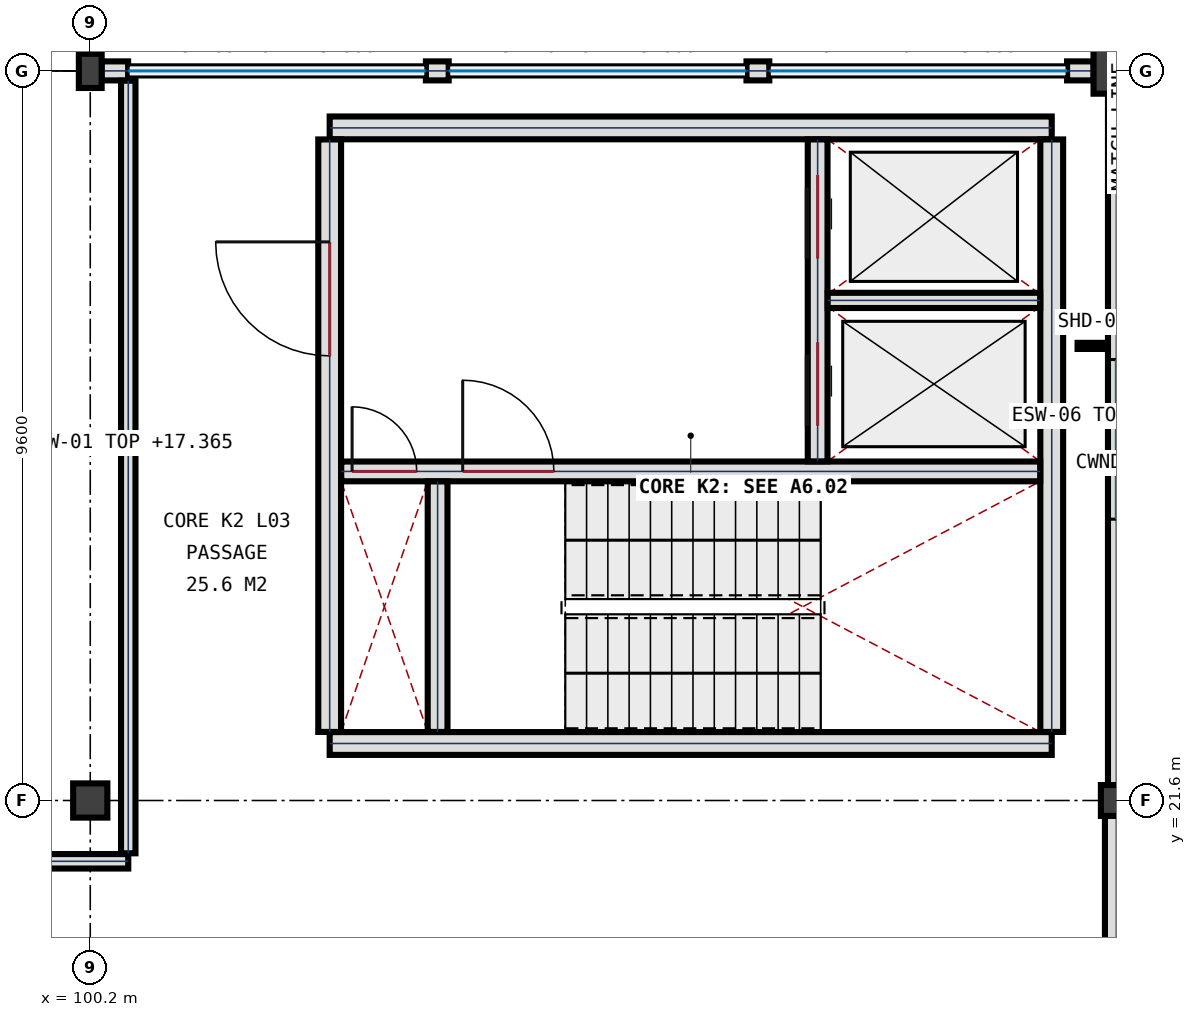
"""IFC4 building model, lengths in metres.
Left out: names, types, materials, properties, quantities, classifications, styles, units other than length and angle.
Written with IfcOpenShell. Run it as: python <this file> out.ifc"""

import sys

from ifc_helpers import new_model, si_unit, direction, frame, frame_2d, origin, origin_2d, place, context, subcontext, project, spatial, rectangle, circle, hollow_circle, i_section, extrude, element, fill, save


model = new_model("IFC4")
c1 = context("Model", 3, precision=1e-05, world=origin(), true_north=direction((0.0, 1.0)))
c2 = subcontext(c1, "Body", "Model", "MODEL_VIEW")
j1 = project(units=[si_unit("LENGTHUNIT", "METRE"), si_unit("PLANEANGLEUNIT", "RADIAN")], contexts=[c1])
p1 = place(None, origin())
s1 = spatial("IfcSite", under=j1, at=p1, CompositionType="ELEMENT")
p2 = place(p1, origin())
s2 = spatial("IfcBuilding", under=s1, at=p2, CompositionType="ELEMENT")
p3 = place(p2, frame((0.0, 0.0, 14.4)))
s3 = spatial("IfcBuildingStorey", under=s2, at=p3, CompositionType="ELEMENT", Elevation=14.4)
p4 = place(p3, frame((100.2, 21.6, 0.0), z_axis=(0.0, 0.0, 1.0), x_axis=(1.0, 0.0, 0.0)))
e1 = element("IfcColumn", 1, at=p4, inside=s3, PredefinedType="COLUMN", context=c2, shape_type="SweptSolid", body=[
    extrude(rectangle(XDim=0.45, YDim=0.45, at=origin_2d()), origin(), (0.0, 0.0, 1.0), 4.5),
])
p5 = place(p3, frame((100.2, 31.2, 0.0), z_axis=(0.0, 0.0, 1.0), x_axis=(1.0, 0.0, 0.0)))
e2 = element("IfcColumn", 2, at=p5, inside=s3, PredefinedType="COLUMN", context=c2, shape_type="SweptSolid", body=[
    extrude(i_section(OverallWidth=0.3, OverallDepth=0.45, WebThickness=0.014, FlangeThickness=0.026, FilletRadius=0.027, at=origin_2d()), origin(), (0.0, 0.0, 1.0), 4.5),
])
p6 = place(p3, frame((113.7, 21.6, 0.0), z_axis=(0.0, 0.0, 1.0), x_axis=(1.0, 0.0, 0.0)))
e3 = element("IfcColumn", 3, at=p6, inside=s3, PredefinedType="COLUMN", context=c2, shape_type="SweptSolid", body=[
    extrude(hollow_circle(Radius=0.203, WallThickness=0.016, at=origin_2d()), origin(), (0.0, 0.0, 1.0), 4.5),
])
p7 = place(p3, frame((113.7, 31.2, 0.0), z_axis=(0.0, 0.0, 1.0), x_axis=(1.0, 0.0, 0.0)))
e4 = element("IfcColumn", 4, at=p7, inside=s3, PredefinedType="COLUMN", context=c2, shape_type="SweptSolid", body=[
    extrude(circle(Radius=0.3, at=origin_2d()), origin(), (0.0, 0.0, 1.0), 4.5),
])
p8 = place(p3, frame((100.2, 31.773, 0.0), z_axis=(0.0, 0.0, 1.0), x_axis=(0.0, -1.0, 0.0)))
e5 = element("IfcWall", 5, at=p8, inside=s3, PredefinedType="SOLIDWALL", context=c2, shape_type="SweptSolid", body=[
    extrude(rectangle(XDim=0.35, YDim=0.25, at=frame_2d((0.175, 0.0))), origin(), (0.0, 0.0, 1.0), 3.6),
])
for number, where, z_axis, x_axis in (
    (6, (100.348, 31.2, 0.0), (0.0, 0.0, 1.0), (1.0, 0.0, 0.0)),
    (7, (113.052, 31.2, 0.0), (0.0, 0.0, 1.0), (1.0, 0.0, 0.0)),
):
    element("IfcWall", number, at=place(p3, frame(where, z_axis=z_axis, x_axis=x_axis)), inside=s3, PredefinedType="SOLIDWALL", context=c2, shape_type="SweptSolid", body=[
        extrude(rectangle(XDim=0.35, YDim=0.25, at=frame_2d((0.175, 0.0))), origin(), (0.0, 0.0, 1.0), 3.6),
    ])
for number, where, z_axis, x_axis in (
    (8, (104.616, 31.2, 0.0), (0.0, 0.0, 1.0), (1.0, 0.0, 0.0)),
    (9, (108.834, 31.2, 0.0), (0.0, 0.0, 1.0), (1.0, 0.0, 0.0)),
):
    element("IfcWall", number, at=place(p3, frame(where, z_axis=z_axis, x_axis=x_axis)), inside=s3, PredefinedType="SOLIDWALL", context=c2, shape_type="SweptSolid", body=[
        extrude(rectangle(XDim=0.3, YDim=0.25, at=frame_2d((0.15, 0.0))), origin(), (0.0, 0.0, 1.0), 3.6),
    ])
p9 = place(p3, frame((113.7, 30.902, 0.0), z_axis=(0.0, 0.0, 1.0), x_axis=(0.0, -1.0, 0.0)))
e10 = element("IfcWall", 10, at=p9, inside=s3, PredefinedType="SOLIDWALL", context=c2, shape_type="SweptSolid", body=[
    extrude(rectangle(XDim=9.101, YDim=0.22, at=frame_2d((4.55, 0.0))), origin(), (0.0, 0.0, 1.0), 3.21),
])
p10 = place(p9, frame((3.5, 0.0, 0.95)))
e11 = element("IfcOpeningElement", 11, at=p10, cuts=e10, PredefinedType="OPENING", context=c2, shape_type="SweptSolid", body=[
    extrude(rectangle(XDim=2.1, YDim=1.35, at=frame_2d((1.05, 0.675))), frame((0.0, 0.12, 0.0), z_axis=(0.0, -1.0, 0.0), x_axis=(1.0, 0.0, 0.0)), (0.0, 0.0, 1.0), 0.24),
])
p11 = place(p3, frame((113.7, 21.399, 0.0), z_axis=(0.0, 0.0, 1.0), x_axis=(0.0, -1.0, 0.0)))
e12 = element("IfcWall", 12, at=p11, inside=s3, PredefinedType="SOLIDWALL", context=c2, shape_type="SweptSolid", body=[
    extrude(rectangle(XDim=9.001, YDim=0.3, at=frame_2d((4.5, 0.0))), origin(), (0.0, 0.0, 1.0), 3.5),
])
p12 = place(p11, frame((5.849, 0.0, 0.0)))
e13 = element("IfcOpeningElement", 13, at=p12, cuts=e12, PredefinedType="OPENING", context=c2, shape_type="SweptSolid", body=[
    extrude(rectangle(XDim=1.5, YDim=2.2, at=frame_2d((0.75, 1.1))), frame((0.0, 0.16, 0.0), z_axis=(0.0, -1.0, 0.0), x_axis=(1.0, 0.0, 0.0)), (0.0, 0.0, 1.0), 0.32),
])
for number, where, z_axis, x_axis in (
    (14, (112.85, 22.35, 0.0), (0.0, 0.0, 1.0), (-1.0, 0.0, 0.0)),
    (15, (103.35, 30.45, 0.0), (0.0, 0.0, 1.0), (1.0, 0.0, 0.0)),
):
    element("IfcWall", number, at=place(p3, frame(where, z_axis=z_axis, x_axis=x_axis)), inside=s3, PredefinedType="SHEAR", context=c2, shape_type="SweptSolid", body=[
        extrude(rectangle(XDim=9.5, YDim=0.3, at=frame_2d((4.75, 0.0))), origin(), (0.0, 0.0, 1.0), 4.5),
    ])
p13 = place(p3, frame((103.35, 22.502, 0.0), z_axis=(0.0, 0.0, 1.0), x_axis=(0.0, 1.0, 0.0)))
e16 = element("IfcWall", 16, at=p13, inside=s3, PredefinedType="SHEAR", context=c2, shape_type="SweptSolid", body=[
    extrude(rectangle(XDim=7.796, YDim=0.3, at=frame_2d((3.898, 0.0))), origin(), (0.0, 0.0, 1.0), 4.5),
])
p14 = place(p13, frame((4.948, 0.0, 0.0)))
e17 = element("IfcOpeningElement", 17, at=p14, cuts=e16, PredefinedType="OPENING", context=c2, shape_type="SweptSolid", body=[
    extrude(rectangle(XDim=1.5, YDim=2.25, at=frame_2d((0.75, 1.125))), frame((0.0, 0.16, 0.0), z_axis=(0.0, -1.0, 0.0), x_axis=(1.0, 0.0, 0.0)), (0.0, 0.0, 1.0), 0.32),
])
p15 = place(p3, frame((112.85, 30.298, 0.0), z_axis=(0.0, 0.0, 1.0), x_axis=(0.0, -1.0, 0.0)))
e18 = element("IfcWall", 18, at=p15, inside=s3, PredefinedType="SHEAR", context=c2, shape_type="SweptSolid", body=[
    extrude(rectangle(XDim=7.796, YDim=0.3, at=frame_2d((3.898, 0.0))), origin(), (0.0, 0.0, 1.0), 4.5),
])
p16 = place(p3, frame((103.502, 25.93, 0.0), z_axis=(0.0, 0.0, 1.0), x_axis=(1.0, 0.0, 0.0)))
e19 = element("IfcWall", 19, at=p16, inside=s3, PredefinedType="SHEAR", context=c2, shape_type="SweptSolid", body=[
    extrude(rectangle(XDim=9.196, YDim=0.26, at=frame_2d((4.598, 0.0))), origin(), (0.0, 0.0, 1.0), 4.5),
])
p17 = place(p16, frame((1.598, 0.0, 0.0)))
e20 = element("IfcOpeningElement", 20, at=p17, cuts=e19, PredefinedType="OPENING", context=c2, shape_type="SweptSolid", body=[
    extrude(rectangle(XDim=1.2, YDim=2.2, at=frame_2d((0.6, 1.1))), frame((0.0, 0.14, 0.0), z_axis=(0.0, -1.0, 0.0), x_axis=(1.0, 0.0, 0.0)), (0.0, 0.0, 1.0), 0.28),
])
p18 = place(p16, frame((0.143, 0.0, 0.0)))
e21 = element("IfcOpeningElement", 21, at=p18, cuts=e19, PredefinedType="OPENING", context=c2, shape_type="SweptSolid", body=[
    extrude(rectangle(XDim=0.85, YDim=2.05, at=frame_2d((0.425, 1.025))), frame((0.0, 0.14, 0.0), z_axis=(0.0, -1.0, 0.0), x_axis=(1.0, 0.0, 0.0)), (0.0, 0.0, 1.0), 0.28),
])
p19 = place(p3, frame((104.77, 22.502, 0.0), z_axis=(0.0, 0.0, 1.0), x_axis=(0.0, 1.0, 0.0)))
e22 = element("IfcWall", 22, at=p19, inside=s3, PredefinedType="SHEAR", context=c2, shape_type="SweptSolid", body=[
    extrude(rectangle(XDim=3.296, YDim=0.26, at=frame_2d((1.648, 0.0))), origin(), (0.0, 0.0, 1.0), 4.5),
])
p20 = place(p3, frame((109.77, 26.062, 0.0), z_axis=(0.0, 0.0, 1.0), x_axis=(0.0, 1.0, 0.0)))
e23 = element("IfcWall", 23, at=p20, inside=s3, PredefinedType="SHEAR", context=c2, shape_type="SweptSolid", body=[
    extrude(rectangle(XDim=4.236, YDim=0.26, at=frame_2d((2.118, 0.0))), origin(), (0.0, 0.0, 1.0), 4.5),
])
p21 = place(p20, frame((0.468, 0.0, 0.0)))
e24 = element("IfcOpeningElement", 24, at=p21, cuts=e23, PredefinedType="OPENING", context=c2, shape_type="SweptSolid", body=[
    extrude(rectangle(XDim=1.1, YDim=2.15, at=frame_2d((0.55, 1.075))), frame((0.0, 0.14, 0.0), z_axis=(0.0, -1.0, 0.0), x_axis=(1.0, 0.0, 0.0)), (0.0, 0.0, 1.0), 0.28),
])
p22 = place(p20, frame((2.668, 0.0, 0.0)))
e25 = element("IfcOpeningElement", 25, at=p22, cuts=e23, PredefinedType="OPENING", context=c2, shape_type="SweptSolid", body=[
    extrude(rectangle(XDim=1.1, YDim=2.15, at=frame_2d((0.55, 1.075))), frame((0.0, 0.14, 0.0), z_axis=(0.0, -1.0, 0.0), x_axis=(1.0, 0.0, 0.0)), (0.0, 0.0, 1.0), 0.28),
])
p23 = place(p3, frame((109.902, 28.18, 0.0), z_axis=(0.0, 0.0, 1.0), x_axis=(1.0, 0.0, 0.0)))
e26 = element("IfcWall", 26, at=p23, inside=s3, PredefinedType="PLUMBINGWALL", context=c2, shape_type="SweptSolid", body=[
    extrude(rectangle(XDim=2.796, YDim=0.2, at=frame_2d((1.398, 0.0))), origin(), (0.0, 0.0, 1.0), 4.16),
])
p24 = place(p3, frame((59.2, 20.8, 0.0), z_axis=(0.0, 0.0, 1.0), x_axis=(1.0, 0.0, 0.0)))
e27 = element("IfcWall", 27, at=p24, inside=s3, PredefinedType="PARTITIONING", context=c2, shape_type="SweptSolid", body=[
    extrude(rectangle(XDim=41.5, YDim=0.19, at=frame_2d((20.75, 0.0))), origin(), (0.0, 0.0, 1.0), 3.5),
])
p25 = place(p24, frame((19.875, 0.0, 0.0)))
e28 = element("IfcOpeningElement", 28, at=p25, cuts=e27, PredefinedType="OPENING", context=c2, shape_type="SweptSolid", body=[
    extrude(rectangle(XDim=1.85, YDim=2.35, at=frame_2d((0.925, 1.175))), frame((0.0, 0.105, 0.0), z_axis=(0.0, -1.0, 0.0), x_axis=(1.0, 0.0, 0.0)), (0.0, 0.0, 1.0), 0.21),
])
p26 = place(p3, frame((100.7, 20.905, 0.0), z_axis=(0.0, 0.0, 1.0), x_axis=(0.0, 1.0, 0.0)))
e29 = element("IfcWall", 29, at=p26, inside=s3, PredefinedType="PARTITIONING", context=c2, shape_type="SweptSolid", body=[
    extrude(rectangle(XDim=10.166, YDim=0.19, at=frame_2d((5.083, 0.0))), origin(), (0.0, 0.0, 1.0), 2.965),
])
p27 = place(p10, origin())
e30 = element("IfcWindow", 30, at=p27, inside=s3, PartitioningType="SINGLE_PANEL", PredefinedType="WINDOW", context=c2, shape_type="SweptSolid", body=[
    extrude(rectangle(XDim=2.1, YDim=1.35, at=frame_2d((1.05, 0.675))), frame((0.0, 0.032, 0.0), z_axis=(0.0, -1.0, 0.0), x_axis=(1.0, 0.0, 0.0)), (0.0, 0.0, 1.0), 0.065),
])
fill(e11, e30)
p28 = place(p14, origin())
e31 = element("IfcDoor", 31, at=p28, inside=s3, OperationType="SINGLE_SWING_RIGHT", PredefinedType="DOOR", context=c2, shape_type="SweptSolid", body=[
    extrude(rectangle(XDim=1.5, YDim=2.25, at=frame_2d((0.75, 1.125))), frame((0.0, 0.032, 0.0), z_axis=(0.0, -1.0, 0.0), x_axis=(1.0, 0.0, 0.0)), (0.0, 0.0, 1.0), 0.065),
])
fill(e17, e31)
p29 = place(p17, origin())
e32 = element("IfcDoor", 32, at=p29, inside=s3, OperationType="SINGLE_SWING_LEFT", PredefinedType="DOOR", context=c2, shape_type="SweptSolid", body=[
    extrude(rectangle(XDim=1.2, YDim=2.2, at=frame_2d((0.6, 1.1))), frame((0.0, 0.032, 0.0), z_axis=(0.0, -1.0, 0.0), x_axis=(1.0, 0.0, 0.0)), (0.0, 0.0, 1.0), 0.065),
])
fill(e20, e32)
p30 = place(p18, origin())
e33 = element("IfcDoor", 33, at=p30, inside=s3, OperationType="SINGLE_SWING_LEFT", PredefinedType="DOOR", context=c2, shape_type="SweptSolid", body=[
    extrude(rectangle(XDim=0.85, YDim=2.05, at=frame_2d((0.425, 1.025))), frame((0.0, 0.032, 0.0), z_axis=(0.0, -1.0, 0.0), x_axis=(1.0, 0.0, 0.0)), (0.0, 0.0, 1.0), 0.065),
])
fill(e21, e33)
p31 = place(p21, origin())
e34 = element("IfcDoor", 34, at=p31, inside=s3, OperationType="SLIDING_TO_LEFT", PredefinedType="DOOR", context=c2, shape_type="SweptSolid", body=[
    extrude(rectangle(XDim=1.1, YDim=2.15, at=frame_2d((0.55, 1.075))), frame((0.0, 0.032, 0.0), z_axis=(0.0, -1.0, 0.0), x_axis=(1.0, 0.0, 0.0)), (0.0, 0.0, 1.0), 0.065),
])
fill(e24, e34)
p32 = place(p22, origin())
e35 = element("IfcDoor", 35, at=p32, inside=s3, OperationType="SLIDING_TO_LEFT", PredefinedType="DOOR", context=c2, shape_type="SweptSolid", body=[
    extrude(rectangle(XDim=1.1, YDim=2.15, at=frame_2d((0.55, 1.075))), frame((0.0, 0.032, 0.0), z_axis=(0.0, -1.0, 0.0), x_axis=(1.0, 0.0, 0.0)), (0.0, 0.0, 1.0), 0.065),
])
fill(e25, e35)
save(model, sys.argv[1])
